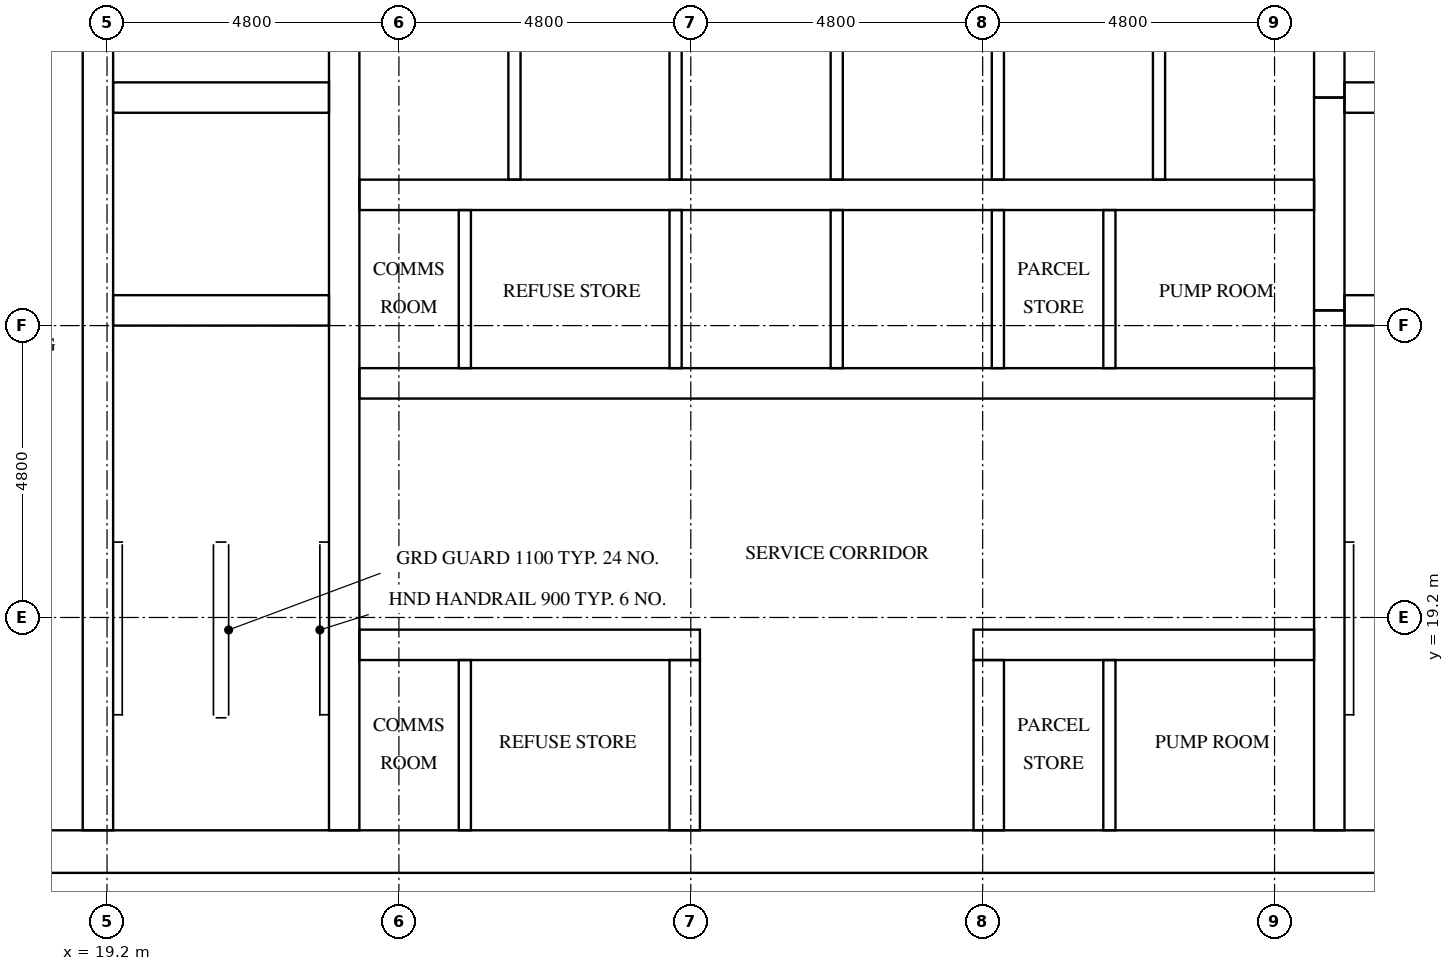
"""IFC4 building model, lengths in metres.
Left out: names, types, materials, properties, quantities, classifications, styles, units other than length and angle.
Written with IfcOpenShell. Run it as: python <this file> out.ifc"""

import sys

from ifc_helpers import new_model, si_unit, direction, frame, frame_2d, origin, place, context, subcontext, project, spatial, rectangle, extrude, element, fill, save


model = new_model("IFC4")
c1 = context("Model", 3, precision=1e-05, world=origin(), true_north=direction((0.0, 1.0)))
c2 = subcontext(c1, "Body", "Model", "MODEL_VIEW")
j1 = project(units=[si_unit("LENGTHUNIT", "METRE"), si_unit("PLANEANGLEUNIT", "RADIAN")], contexts=[c1])
p1 = place(None, origin())
s1 = spatial("IfcSite", under=j1, at=p1, CompositionType="ELEMENT")
p2 = place(p1, origin())
s2 = spatial("IfcBuilding", under=s1, at=p2, CompositionType="ELEMENT")
p3 = place(p2, frame((0.0, 0.0, 189.4)))
s3 = spatial("IfcBuildingStorey", under=s2, at=p3, CompositionType="ELEMENT", Elevation=189.4)
p4 = place(p3, frame((15.0, 15.35, 0.0), z_axis=(0.0, 0.0, 1.0), x_axis=(1.0, 0.0, 0.0)))
e1 = element("IfcWall", 1, at=p4, inside=s3, PredefinedType="SHEAR", context=c2, shape_type="SweptSolid", body=[
    extrude(rectangle(XDim=32.4, YDim=0.7, at=frame_2d((16.2, 0.0))), origin(), (0.0, 0.0, 1.0), 3.2),
])
p5 = place(p4, frame((15.3, 0.0, 0.0)))
e2 = element("IfcOpeningElement", 2, at=p5, cuts=e1, PredefinedType="OPENING", context=c2, shape_type="SweptSolid", body=[
    extrude(rectangle(XDim=1.8, YDim=2.1, at=frame_2d((0.9, 1.05))), frame((0.0, 0.36, 0.0), z_axis=(0.0, -1.0, 0.0), x_axis=(1.0, 0.0, 0.0)), (0.0, 0.0, 1.0), 0.72),
])
p6 = place(p3, frame((19.05, 15.7, 0.0), z_axis=(0.0, 0.0, 1.0), x_axis=(0.0, 1.0, 0.0)))
e3 = element("IfcWall", 3, at=p6, inside=s3, PredefinedType="SHEAR", context=c2, shape_type="SweptSolid", body=[
    extrude(rectangle(XDim=15.3, YDim=0.5, at=frame_2d((7.65, 0.0))), origin(), (0.0, 0.0, 1.0), 3.2),
])
p7 = place(p6, frame((9.75, 0.0, 0.0)))
e4 = element("IfcOpeningElement", 4, at=p7, cuts=e3, PredefinedType="OPENING", context=c2, shape_type="SweptSolid", body=[
    extrude(rectangle(XDim=1.1, YDim=2.1, at=frame_2d((0.55, 1.05))), frame((0.0, 0.26, 0.0), z_axis=(0.0, -1.0, 0.0), x_axis=(1.0, 0.0, 0.0)), (0.0, 0.0, 1.0), 0.52),
])
p8 = place(p6, frame((13.25, 0.0, 0.0)))
e5 = element("IfcOpeningElement", 5, at=p8, cuts=e3, PredefinedType="OPENING", context=c2, shape_type="SweptSolid", body=[
    extrude(rectangle(XDim=1.1, YDim=2.1, at=frame_2d((0.55, 1.05))), frame((0.0, 0.26, 0.0), z_axis=(0.0, -1.0, 0.0), x_axis=(1.0, 0.0, 0.0)), (0.0, 0.0, 1.0), 0.52),
])
p9 = place(p6, frame((0.5, 0.0, 0.0)))
e6 = element("IfcOpeningElement", 6, at=p9, cuts=e3, PredefinedType="OPENING", context=c2, shape_type="SweptSolid", body=[
    extrude(rectangle(XDim=1.2, YDim=2.1, at=frame_2d((0.6, 1.05))), frame((0.0, 0.26, 0.0), z_axis=(0.0, -1.0, 0.0), x_axis=(1.0, 0.0, 0.0)), (0.0, 0.0, 1.0), 0.52),
])
p10 = place(p3, frame((23.1, 15.7, 0.0), z_axis=(0.0, 0.0, 1.0), x_axis=(0.0, 1.0, 0.0)))
e7 = element("IfcWall", 7, at=p10, inside=s3, PredefinedType="SHEAR", context=c2, shape_type="SweptSolid", body=[
    extrude(rectangle(XDim=21.4, YDim=0.5, at=frame_2d((10.7, 0.0))), origin(), (0.0, 0.0, 1.0), 3.2),
])
p11 = place(p3, frame((39.3, 15.7, 0.0), z_axis=(0.0, 0.0, 1.0), x_axis=(0.0, 1.0, 0.0)))
e8 = element("IfcWall", 8, at=p11, inside=s3, PredefinedType="SHEAR", context=c2, shape_type="SweptSolid", body=[
    extrude(rectangle(XDim=8.55, YDim=0.5, at=frame_2d((4.275, 0.0))), origin(), (0.0, 0.0, 1.0), 3.2),
])
p12 = place(p3, frame((39.3, 24.25, 0.0), z_axis=(0.0, 0.0, 1.0), x_axis=(0.0, 1.0, 0.0)))
e9 = element("IfcWall", 9, at=p12, inside=s3, PredefinedType="SHEAR", context=c2, shape_type="SweptSolid", body=[
    extrude(rectangle(XDim=3.5, YDim=0.5, at=frame_2d((1.75, 0.0))), origin(), (0.0, 0.0, 1.0), 3.2),
])
p13 = place(p3, frame((39.3, 27.75, 0.0), z_axis=(0.0, 0.0, 1.0), x_axis=(0.0, 1.0, 0.0)))
e10 = element("IfcWall", 10, at=p13, inside=s3, PredefinedType="SHEAR", context=c2, shape_type="SweptSolid", body=[
    extrude(rectangle(XDim=9.35, YDim=0.5, at=frame_2d((4.675, 0.0))), origin(), (0.0, 0.0, 1.0), 3.2),
])
for number, where, z_axis, x_axis in (
    (11, (19.3, 24.25, 0.0), (0.0, 0.0, 1.0), (1.0, 0.0, 0.0)),
    (12, (19.3, 27.75, 0.0), (0.0, 0.0, 1.0), (1.0, 0.0, 0.0)),
    (13, (39.55, 24.25, 0.0), (0.0, 0.0, 1.0), (1.0, 0.0, 0.0)),
    (14, (39.55, 27.75, 0.0), (0.0, 0.0, 1.0), (1.0, 0.0, 0.0)),
):
    element("IfcWall", number, at=place(p3, frame(where, z_axis=z_axis, x_axis=x_axis)), inside=s3, PredefinedType="SHEAR", context=c2, shape_type="SweptSolid", body=[
        extrude(rectangle(XDim=3.55, YDim=0.5, at=frame_2d((1.775, 0.0))), origin(), (0.0, 0.0, 1.0), 3.2),
    ])
p14 = place(p3, frame((23.35, 18.75, 0.0), z_axis=(0.0, 0.0, 1.0), x_axis=(1.0, 0.0, 0.0)))
e15 = element("IfcWall", 15, at=p14, inside=s3, PredefinedType="SHEAR", context=c2, shape_type="SweptSolid", body=[
    extrude(rectangle(XDim=5.6, YDim=0.5, at=frame_2d((2.8, 0.0))), origin(), (0.0, 0.0, 1.0), 3.2),
])
p15 = place(p14, frame((0.317, 0.0, 0.0)))
e16 = element("IfcOpeningElement", 16, at=p15, cuts=e15, PredefinedType="OPENING", context=c2, shape_type="SweptSolid", body=[
    extrude(rectangle(XDim=1.0, YDim=2.1, at=frame_2d((0.5, 1.05))), frame((0.0, 0.26, 0.0), z_axis=(0.0, -1.0, 0.0), x_axis=(1.0, 0.0, 0.0)), (0.0, 0.0, 1.0), 0.52),
])
p16 = place(p14, frame((2.967, 0.0, 0.0)))
e17 = element("IfcOpeningElement", 17, at=p16, cuts=e15, PredefinedType="OPENING", context=c2, shape_type="SweptSolid", body=[
    extrude(rectangle(XDim=1.0, YDim=2.1, at=frame_2d((0.5, 1.05))), frame((0.0, 0.26, 0.0), z_axis=(0.0, -1.0, 0.0), x_axis=(1.0, 0.0, 0.0)), (0.0, 0.0, 1.0), 0.52),
])
p17 = place(p3, frame((33.45, 18.75, 0.0), z_axis=(0.0, 0.0, 1.0), x_axis=(1.0, 0.0, 0.0)))
e18 = element("IfcWall", 18, at=p17, inside=s3, PredefinedType="SHEAR", context=c2, shape_type="SweptSolid", body=[
    extrude(rectangle(XDim=5.6, YDim=0.5, at=frame_2d((2.8, 0.0))), origin(), (0.0, 0.0, 1.0), 3.2),
])
p18 = place(p17, frame((0.817, 0.0, 0.0)))
e19 = element("IfcOpeningElement", 19, at=p18, cuts=e18, PredefinedType="OPENING", context=c2, shape_type="SweptSolid", body=[
    extrude(rectangle(XDim=1.0, YDim=2.1, at=frame_2d((0.5, 1.05))), frame((0.0, 0.26, 0.0), z_axis=(0.0, -1.0, 0.0), x_axis=(1.0, 0.0, 0.0)), (0.0, 0.0, 1.0), 0.52),
])
p19 = place(p17, frame((3.467, 0.0, 0.0)))
e20 = element("IfcOpeningElement", 20, at=p19, cuts=e18, PredefinedType="OPENING", context=c2, shape_type="SweptSolid", body=[
    extrude(rectangle(XDim=1.0, YDim=2.1, at=frame_2d((0.5, 1.05))), frame((0.0, 0.26, 0.0), z_axis=(0.0, -1.0, 0.0), x_axis=(1.0, 0.0, 0.0)), (0.0, 0.0, 1.0), 0.52),
])
p20 = place(p3, frame((23.35, 23.05, 0.0), z_axis=(0.0, 0.0, 1.0), x_axis=(1.0, 0.0, 0.0)))
e21 = element("IfcWall", 21, at=p20, inside=s3, PredefinedType="SHEAR", context=c2, shape_type="SweptSolid", body=[
    extrude(rectangle(XDim=15.7, YDim=0.5, at=frame_2d((7.85, 0.0))), origin(), (0.0, 0.0, 1.0), 3.2),
])
p21 = place(p20, frame((0.317, 0.0, 0.0)))
e22 = element("IfcOpeningElement", 22, at=p21, cuts=e21, PredefinedType="OPENING", context=c2, shape_type="SweptSolid", body=[
    extrude(rectangle(XDim=1.0, YDim=2.1, at=frame_2d((0.5, 1.05))), frame((0.0, 0.26, 0.0), z_axis=(0.0, -1.0, 0.0), x_axis=(1.0, 0.0, 0.0)), (0.0, 0.0, 1.0), 0.52),
])
p22 = place(p20, frame((2.967, 0.0, 0.0)))
e23 = element("IfcOpeningElement", 23, at=p22, cuts=e21, PredefinedType="OPENING", context=c2, shape_type="SweptSolid", body=[
    extrude(rectangle(XDim=1.0, YDim=2.1, at=frame_2d((0.5, 1.05))), frame((0.0, 0.26, 0.0), z_axis=(0.0, -1.0, 0.0), x_axis=(1.0, 0.0, 0.0)), (0.0, 0.0, 1.0), 0.52),
])
p23 = place(p20, frame((10.917, 0.0, 0.0)))
e24 = element("IfcOpeningElement", 24, at=p23, cuts=e21, PredefinedType="OPENING", context=c2, shape_type="SweptSolid", body=[
    extrude(rectangle(XDim=1.0, YDim=2.1, at=frame_2d((0.5, 1.05))), frame((0.0, 0.26, 0.0), z_axis=(0.0, -1.0, 0.0), x_axis=(1.0, 0.0, 0.0)), (0.0, 0.0, 1.0), 0.52),
])
p24 = place(p20, frame((13.567, 0.0, 0.0)))
e25 = element("IfcOpeningElement", 25, at=p24, cuts=e21, PredefinedType="OPENING", context=c2, shape_type="SweptSolid", body=[
    extrude(rectangle(XDim=1.0, YDim=2.1, at=frame_2d((0.5, 1.05))), frame((0.0, 0.26, 0.0), z_axis=(0.0, -1.0, 0.0), x_axis=(1.0, 0.0, 0.0)), (0.0, 0.0, 1.0), 0.52),
])
p25 = place(p3, frame((23.35, 26.15, 0.0), z_axis=(0.0, 0.0, 1.0), x_axis=(1.0, 0.0, 0.0)))
e26 = element("IfcWall", 26, at=p25, inside=s3, PredefinedType="SHEAR", context=c2, shape_type="SweptSolid", body=[
    extrude(rectangle(XDim=15.7, YDim=0.5, at=frame_2d((7.85, 0.0))), origin(), (0.0, 0.0, 1.0), 3.2),
])
for number, where, z_axis, x_axis in (
    (27, (28.7, 15.7, 0.0), (0.0, 0.0, 1.0), (0.0, 1.0, 0.0)),
    (28, (33.7, 15.7, 0.0), (0.0, 0.0, 1.0), (0.0, 1.0, 0.0)),
):
    element("IfcWall", number, at=place(p3, frame(where, z_axis=z_axis, x_axis=x_axis)), inside=s3, PredefinedType="SHEAR", context=c2, shape_type="SweptSolid", body=[
        extrude(rectangle(XDim=2.8, YDim=0.5, at=frame_2d((1.4, 0.0))), origin(), (0.0, 0.0, 1.0), 3.2),
    ])
p26 = place(p3, frame((25.9, 26.4, 0.0), z_axis=(0.0, 0.0, 1.0), x_axis=(0.0, 1.0, 0.0)))
e29 = element("IfcWall", 29, at=p26, inside=s3, PredefinedType="SOLIDWALL", context=c2, shape_type="SweptSolid", body=[
    extrude(rectangle(XDim=2.6, YDim=0.2, at=frame_2d((1.3, 0.0))), origin(), (0.0, 0.0, 1.0), 3.2),
])
p27 = place(p3, frame((28.55, 23.3, 0.0), z_axis=(0.0, 0.0, 1.0), x_axis=(0.0, 1.0, 0.0)))
e30 = element("IfcWall", 30, at=p27, inside=s3, PredefinedType="SOLIDWALL", context=c2, shape_type="SweptSolid", body=[
    extrude(rectangle(XDim=2.6, YDim=0.2, at=frame_2d((1.3, 0.0))), origin(), (0.0, 0.0, 1.0), 3.2),
])
p28 = place(p3, frame((28.55, 26.4, 0.0), z_axis=(0.0, 0.0, 1.0), x_axis=(0.0, 1.0, 0.0)))
e31 = element("IfcWall", 31, at=p28, inside=s3, PredefinedType="SOLIDWALL", context=c2, shape_type="SweptSolid", body=[
    extrude(rectangle(XDim=2.6, YDim=0.2, at=frame_2d((1.3, 0.0))), origin(), (0.0, 0.0, 1.0), 3.2),
])
p29 = place(p3, frame((31.2, 23.3, 0.0), z_axis=(0.0, 0.0, 1.0), x_axis=(0.0, 1.0, 0.0)))
e32 = element("IfcWall", 32, at=p29, inside=s3, PredefinedType="SOLIDWALL", context=c2, shape_type="SweptSolid", body=[
    extrude(rectangle(XDim=2.6, YDim=0.2, at=frame_2d((1.3, 0.0))), origin(), (0.0, 0.0, 1.0), 3.2),
])
p30 = place(p3, frame((31.2, 26.4, 0.0), z_axis=(0.0, 0.0, 1.0), x_axis=(0.0, 1.0, 0.0)))
e33 = element("IfcWall", 33, at=p30, inside=s3, PredefinedType="SOLIDWALL", context=c2, shape_type="SweptSolid", body=[
    extrude(rectangle(XDim=2.6, YDim=0.2, at=frame_2d((1.3, 0.0))), origin(), (0.0, 0.0, 1.0), 3.2),
])
p31 = place(p3, frame((33.85, 23.3, 0.0), z_axis=(0.0, 0.0, 1.0), x_axis=(0.0, 1.0, 0.0)))
e34 = element("IfcWall", 34, at=p31, inside=s3, PredefinedType="SOLIDWALL", context=c2, shape_type="SweptSolid", body=[
    extrude(rectangle(XDim=2.6, YDim=0.2, at=frame_2d((1.3, 0.0))), origin(), (0.0, 0.0, 1.0), 3.2),
])
for number, where, z_axis, x_axis in (
    (35, (33.85, 26.4, 0.0), (0.0, 0.0, 1.0), (0.0, 1.0, 0.0)),
    (36, (36.5, 26.4, 0.0), (0.0, 0.0, 1.0), (0.0, 1.0, 0.0)),
):
    element("IfcWall", number, at=place(p3, frame(where, z_axis=z_axis, x_axis=x_axis)), inside=s3, PredefinedType="SOLIDWALL", context=c2, shape_type="SweptSolid", body=[
        extrude(rectangle(XDim=2.6, YDim=0.2, at=frame_2d((1.3, 0.0))), origin(), (0.0, 0.0, 1.0), 3.2),
    ])
for number, where, z_axis, x_axis in (
    (37, (25.084, 23.3, 0.0), (0.0, 0.0, 1.0), (0.0, 1.0, 0.0)),
    (38, (35.684, 23.3, 0.0), (0.0, 0.0, 1.0), (0.0, 1.0, 0.0)),
):
    element("IfcWall", number, at=place(p3, frame(where, z_axis=z_axis, x_axis=x_axis)), inside=s3, PredefinedType="PARTITIONING", context=c2, shape_type="SweptSolid", body=[
        extrude(rectangle(XDim=2.6, YDim=0.2, at=frame_2d((1.3, 0.0))), origin(), (0.0, 0.0, 1.0), 3.2),
    ])
for number, where, z_axis, x_axis in (
    (39, (25.084, 15.7, 0.0), (0.0, 0.0, 1.0), (0.0, 1.0, 0.0)),
    (40, (35.684, 15.7, 0.0), (0.0, 0.0, 1.0), (0.0, 1.0, 0.0)),
):
    element("IfcWall", number, at=place(p3, frame(where, z_axis=z_axis, x_axis=x_axis)), inside=s3, PredefinedType="PARTITIONING", context=c2, shape_type="SweptSolid", body=[
        extrude(rectangle(XDim=2.8, YDim=0.2, at=frame_2d((1.4, 0.0))), origin(), (0.0, 0.0, 1.0), 3.2),
    ])
p32 = place(p7, origin())
e41 = element("IfcDoor", 41, at=p32, inside=s3, OperationType="DOUBLE_DOOR_SLIDING", PredefinedType="DOOR", context=c2, shape_type="SweptSolid", body=[
    extrude(rectangle(XDim=1.1, YDim=2.1, at=frame_2d((0.55, 1.05))), frame((0.0, 0.025, 0.0), z_axis=(0.0, -1.0, 0.0), x_axis=(1.0, 0.0, 0.0)), (0.0, 0.0, 1.0), 0.05),
])
fill(e4, e41)
p33 = place(p9, frame((1.2, 0.0, 0.0), z_axis=(0.0, 0.0, 1.0), x_axis=(-1.0, 0.0, 0.0)))
e42 = element("IfcDoor", 42, at=p33, inside=s3, OperationType="SINGLE_SWING_LEFT", PredefinedType="DOOR", context=c2, shape_type="SweptSolid", body=[
    extrude(rectangle(XDim=1.2, YDim=2.1, at=frame_2d((0.6, 1.05))), frame((0.0, 0.025, 0.0), z_axis=(0.0, -1.0, 0.0), x_axis=(1.0, 0.0, 0.0)), (0.0, 0.0, 1.0), 0.05),
])
fill(e6, e42)
p34 = place(p5, frame((1.8, 0.0, 0.0), z_axis=(0.0, 0.0, 1.0), x_axis=(-1.0, 0.0, 0.0)))
e43 = element("IfcDoor", 43, at=p34, inside=s3, OperationType="DOUBLE_DOOR_SINGLE_SWING", PredefinedType="DOOR", context=c2, shape_type="SweptSolid", body=[
    extrude(rectangle(XDim=1.8, YDim=2.1, at=frame_2d((0.9, 1.05))), frame((0.0, 0.025, 0.0), z_axis=(0.0, -1.0, 0.0), x_axis=(1.0, 0.0, 0.0)), (0.0, 0.0, 1.0), 0.05),
])
fill(e2, e43)
p35 = place(p21, frame((1.0, 0.0, 0.0), z_axis=(0.0, 0.0, 1.0), x_axis=(-1.0, 0.0, 0.0)))
e44 = element("IfcDoor", 44, at=p35, inside=s3, OperationType="SINGLE_SWING_RIGHT", PredefinedType="DOOR", context=c2, shape_type="SweptSolid", body=[
    extrude(rectangle(XDim=1.0, YDim=2.1, at=frame_2d((0.5, 1.05))), frame((0.0, 0.025, 0.0), z_axis=(0.0, -1.0, 0.0), x_axis=(1.0, 0.0, 0.0)), (0.0, 0.0, 1.0), 0.05),
])
fill(e22, e44)
p36 = place(p22, frame((1.0, 0.0, 0.0), z_axis=(0.0, 0.0, 1.0), x_axis=(-1.0, 0.0, 0.0)))
e45 = element("IfcDoor", 45, at=p36, inside=s3, OperationType="SINGLE_SWING_LEFT", PredefinedType="DOOR", context=c2, shape_type="SweptSolid", body=[
    extrude(rectangle(XDim=1.0, YDim=2.1, at=frame_2d((0.5, 1.05))), frame((0.0, 0.025, 0.0), z_axis=(0.0, -1.0, 0.0), x_axis=(1.0, 0.0, 0.0)), (0.0, 0.0, 1.0), 0.05),
])
fill(e23, e45)
p37 = place(p23, frame((1.0, 0.0, 0.0), z_axis=(0.0, 0.0, 1.0), x_axis=(-1.0, 0.0, 0.0)))
e46 = element("IfcDoor", 46, at=p37, inside=s3, OperationType="SINGLE_SWING_RIGHT", PredefinedType="DOOR", context=c2, shape_type="SweptSolid", body=[
    extrude(rectangle(XDim=1.0, YDim=2.1, at=frame_2d((0.5, 1.05))), frame((0.0, 0.025, 0.0), z_axis=(0.0, -1.0, 0.0), x_axis=(1.0, 0.0, 0.0)), (0.0, 0.0, 1.0), 0.05),
])
fill(e24, e46)
p38 = place(p24, frame((1.0, 0.0, 0.0), z_axis=(0.0, 0.0, 1.0), x_axis=(-1.0, 0.0, 0.0)))
e47 = element("IfcDoor", 47, at=p38, inside=s3, OperationType="SINGLE_SWING_LEFT", PredefinedType="DOOR", context=c2, shape_type="SweptSolid", body=[
    extrude(rectangle(XDim=1.0, YDim=2.1, at=frame_2d((0.5, 1.05))), frame((0.0, 0.025, 0.0), z_axis=(0.0, -1.0, 0.0), x_axis=(1.0, 0.0, 0.0)), (0.0, 0.0, 1.0), 0.05),
])
fill(e25, e47)
p39 = place(p15, origin())
e48 = element("IfcDoor", 48, at=p39, inside=s3, OperationType="SINGLE_SWING_RIGHT", PredefinedType="DOOR", context=c2, shape_type="SweptSolid", body=[
    extrude(rectangle(XDim=1.0, YDim=2.1, at=frame_2d((0.5, 1.05))), frame((0.0, 0.025, 0.0), z_axis=(0.0, -1.0, 0.0), x_axis=(1.0, 0.0, 0.0)), (0.0, 0.0, 1.0), 0.05),
])
fill(e16, e48)
p40 = place(p16, origin())
e49 = element("IfcDoor", 49, at=p40, inside=s3, OperationType="SINGLE_SWING_LEFT", PredefinedType="DOOR", context=c2, shape_type="SweptSolid", body=[
    extrude(rectangle(XDim=1.0, YDim=2.1, at=frame_2d((0.5, 1.05))), frame((0.0, 0.025, 0.0), z_axis=(0.0, -1.0, 0.0), x_axis=(1.0, 0.0, 0.0)), (0.0, 0.0, 1.0), 0.05),
])
fill(e17, e49)
p41 = place(p18, origin())
e50 = element("IfcDoor", 50, at=p41, inside=s3, OperationType="SINGLE_SWING_RIGHT", PredefinedType="DOOR", context=c2, shape_type="SweptSolid", body=[
    extrude(rectangle(XDim=1.0, YDim=2.1, at=frame_2d((0.5, 1.05))), frame((0.0, 0.025, 0.0), z_axis=(0.0, -1.0, 0.0), x_axis=(1.0, 0.0, 0.0)), (0.0, 0.0, 1.0), 0.05),
])
fill(e19, e50)
p42 = place(p19, origin())
e51 = element("IfcDoor", 51, at=p42, inside=s3, OperationType="SINGLE_SWING_LEFT", PredefinedType="DOOR", context=c2, shape_type="SweptSolid", body=[
    extrude(rectangle(XDim=1.0, YDim=2.1, at=frame_2d((0.5, 1.05))), frame((0.0, 0.025, 0.0), z_axis=(0.0, -1.0, 0.0), x_axis=(1.0, 0.0, 0.0)), (0.0, 0.0, 1.0), 0.05),
])
fill(e20, e51)
save(model, sys.argv[1])
